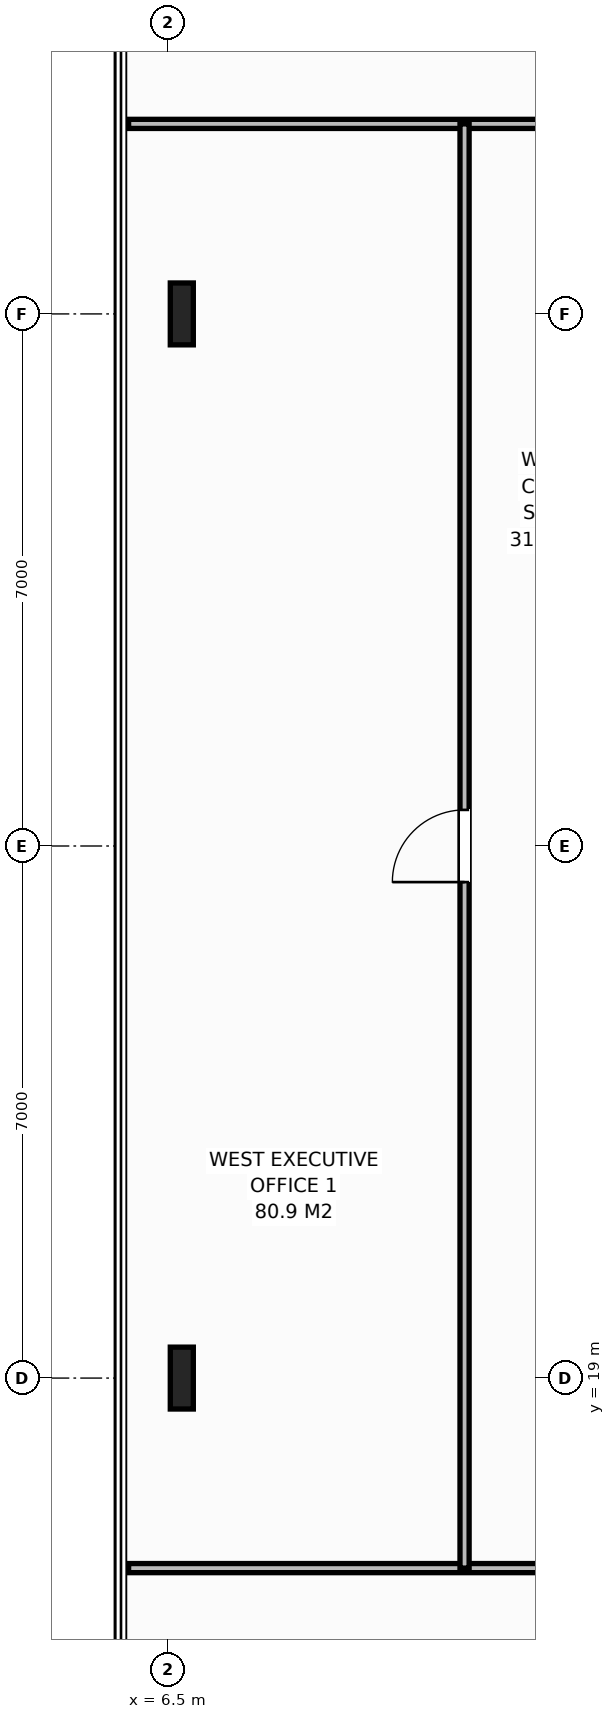
"""IFC4 building model, lengths in metres.
Left out: names, types, materials, properties, quantities, classifications, styles, units other than length and angle.
Written with IfcOpenShell. Run it as: python <this file> out.ifc"""

import sys

from ifc_helpers import new_model, si_unit, direction, frame, frame_2d, origin, origin_2d, place, context, subcontext, project, spatial, rectangle, i_section, extrude, element, fill, save


model = new_model("IFC4")
c1 = context("Model", 3, precision=1e-05, world=origin(), true_north=direction((0.0, 1.0)))
c2 = subcontext(c1, "Body", "Model", "MODEL_VIEW")
j1 = project(units=[si_unit("LENGTHUNIT", "METRE"), si_unit("PLANEANGLEUNIT", "RADIAN")], contexts=[c1])
p1 = place(None, origin())
s1 = spatial("IfcSite", under=j1, at=p1, CompositionType="ELEMENT")
p2 = place(p1, origin())
s2 = spatial("IfcBuilding", under=s1, at=p2, CompositionType="ELEMENT")
p3 = place(p2, frame((0.0, 0.0, 206.2)))
s3 = spatial("IfcBuildingStorey", under=s2, at=p3, CompositionType="ELEMENT", Elevation=206.2)
for number, where, z_axis, x_axis in (
    (1, (6.68, 19.0, 0.0), (0.0, 0.0, 1.0), (1.0, 0.0, 0.0)),
    (2, (6.68, 33.0, 0.0), (0.0, 0.0, 1.0), (1.0, 0.0, 0.0)),
):
    element("IfcColumn", number, at=place(p3, frame(where, z_axis=z_axis, x_axis=x_axis)), inside=s3, PredefinedType="COLUMN", context=c2, shape_type="SweptSolid", body=[
        extrude(i_section(OverallWidth=0.303, OverallDepth=0.814, WebThickness=0.021, FlangeThickness=0.04, at=origin_2d()), origin(), (0.0, 0.0, 1.0), 3.8),
    ])
p4 = place(p3, frame((5.98, 35.5, 0.0), z_axis=(0.0, 0.0, 1.0), x_axis=(1.0, 0.0, 0.0)))
e3 = element("IfcWall", 3, at=p4, inside=s3, PredefinedType="PARTITIONING", context=c2, shape_type="SweptSolid", body=[
    extrude(rectangle(XDim=14.569, YDim=0.12, at=frame_2d((7.284, 0.0))), origin(), (0.0, 0.0, 1.0), 3.58),
])
p5 = place(p4, frame((9.02, 0.0, 0.0)))
e4 = element("IfcOpeningElement", 4, at=p5, cuts=e3, PredefinedType="OPENING", context=c2, shape_type="SweptSolid", body=[
    extrude(rectangle(XDim=0.95, YDim=2.15, at=frame_2d((0.475, 1.075))), frame((0.0, 0.07, 0.0), z_axis=(0.0, -1.0, 0.0), x_axis=(1.0, 0.0, 0.0)), (0.0, 0.0, 1.0), 0.14),
])
p6 = place(p3, frame((5.98, 16.5, 0.0), z_axis=(0.0, 0.0, 1.0), x_axis=(1.0, 0.0, 0.0)))
e5 = element("IfcWall", 5, at=p6, inside=s3, PredefinedType="PARTITIONING", context=c2, shape_type="SweptSolid", body=[
    extrude(rectangle(XDim=13.643, YDim=0.12, at=frame_2d((6.822, 0.0))), origin(), (0.0, 0.0, 1.0), 3.58),
])
p7 = place(p6, frame((8.557, 0.0, 0.0)))
e6 = element("IfcOpeningElement", 6, at=p7, cuts=e5, PredefinedType="OPENING", context=c2, shape_type="SweptSolid", body=[
    extrude(rectangle(XDim=0.95, YDim=2.15, at=frame_2d((0.475, 1.075))), frame((0.0, 0.07, 0.0), z_axis=(0.0, -1.0, 0.0), x_axis=(1.0, 0.0, 0.0)), (0.0, 0.0, 1.0), 0.14),
])
p8 = place(p3, frame((10.4, 16.5, 0.0), z_axis=(0.0, 0.0, 1.0), x_axis=(0.0, 1.0, 0.0)))
e7 = element("IfcWall", 7, at=p8, inside=s3, PredefinedType="PARTITIONING", context=c2, shape_type="SweptSolid", body=[
    extrude(rectangle(XDim=19.0, YDim=0.12, at=frame_2d((9.5, 0.0))), origin(), (0.0, 0.0, 1.0), 3.58),
])
p9 = place(p8, frame((9.025, 0.0, 0.0)))
e8 = element("IfcOpeningElement", 8, at=p9, cuts=e7, PredefinedType="OPENING", context=c2, shape_type="SweptSolid", body=[
    extrude(rectangle(XDim=0.95, YDim=2.15, at=frame_2d((0.475, 1.075))), frame((0.0, 0.07, 0.0), z_axis=(0.0, -1.0, 0.0), x_axis=(1.0, 0.0, 0.0)), (0.0, 0.0, 1.0), 0.14),
])
p10 = place(p9, origin())
e9 = element("IfcDoor", 9, at=p10, inside=s3, OperationType="SINGLE_SWING_LEFT", PredefinedType="DOOR", context=c2, shape_type="SweptSolid", body=[
    extrude(rectangle(XDim=0.95, YDim=2.15, at=frame_2d((0.475, 1.075))), frame((0.0, 0.025, 0.0), z_axis=(0.0, -1.0, 0.0), x_axis=(1.0, 0.0, 0.0)), (0.0, 0.0, 1.0), 0.05),
])
fill(e8, e9)
save(model, sys.argv[1])
